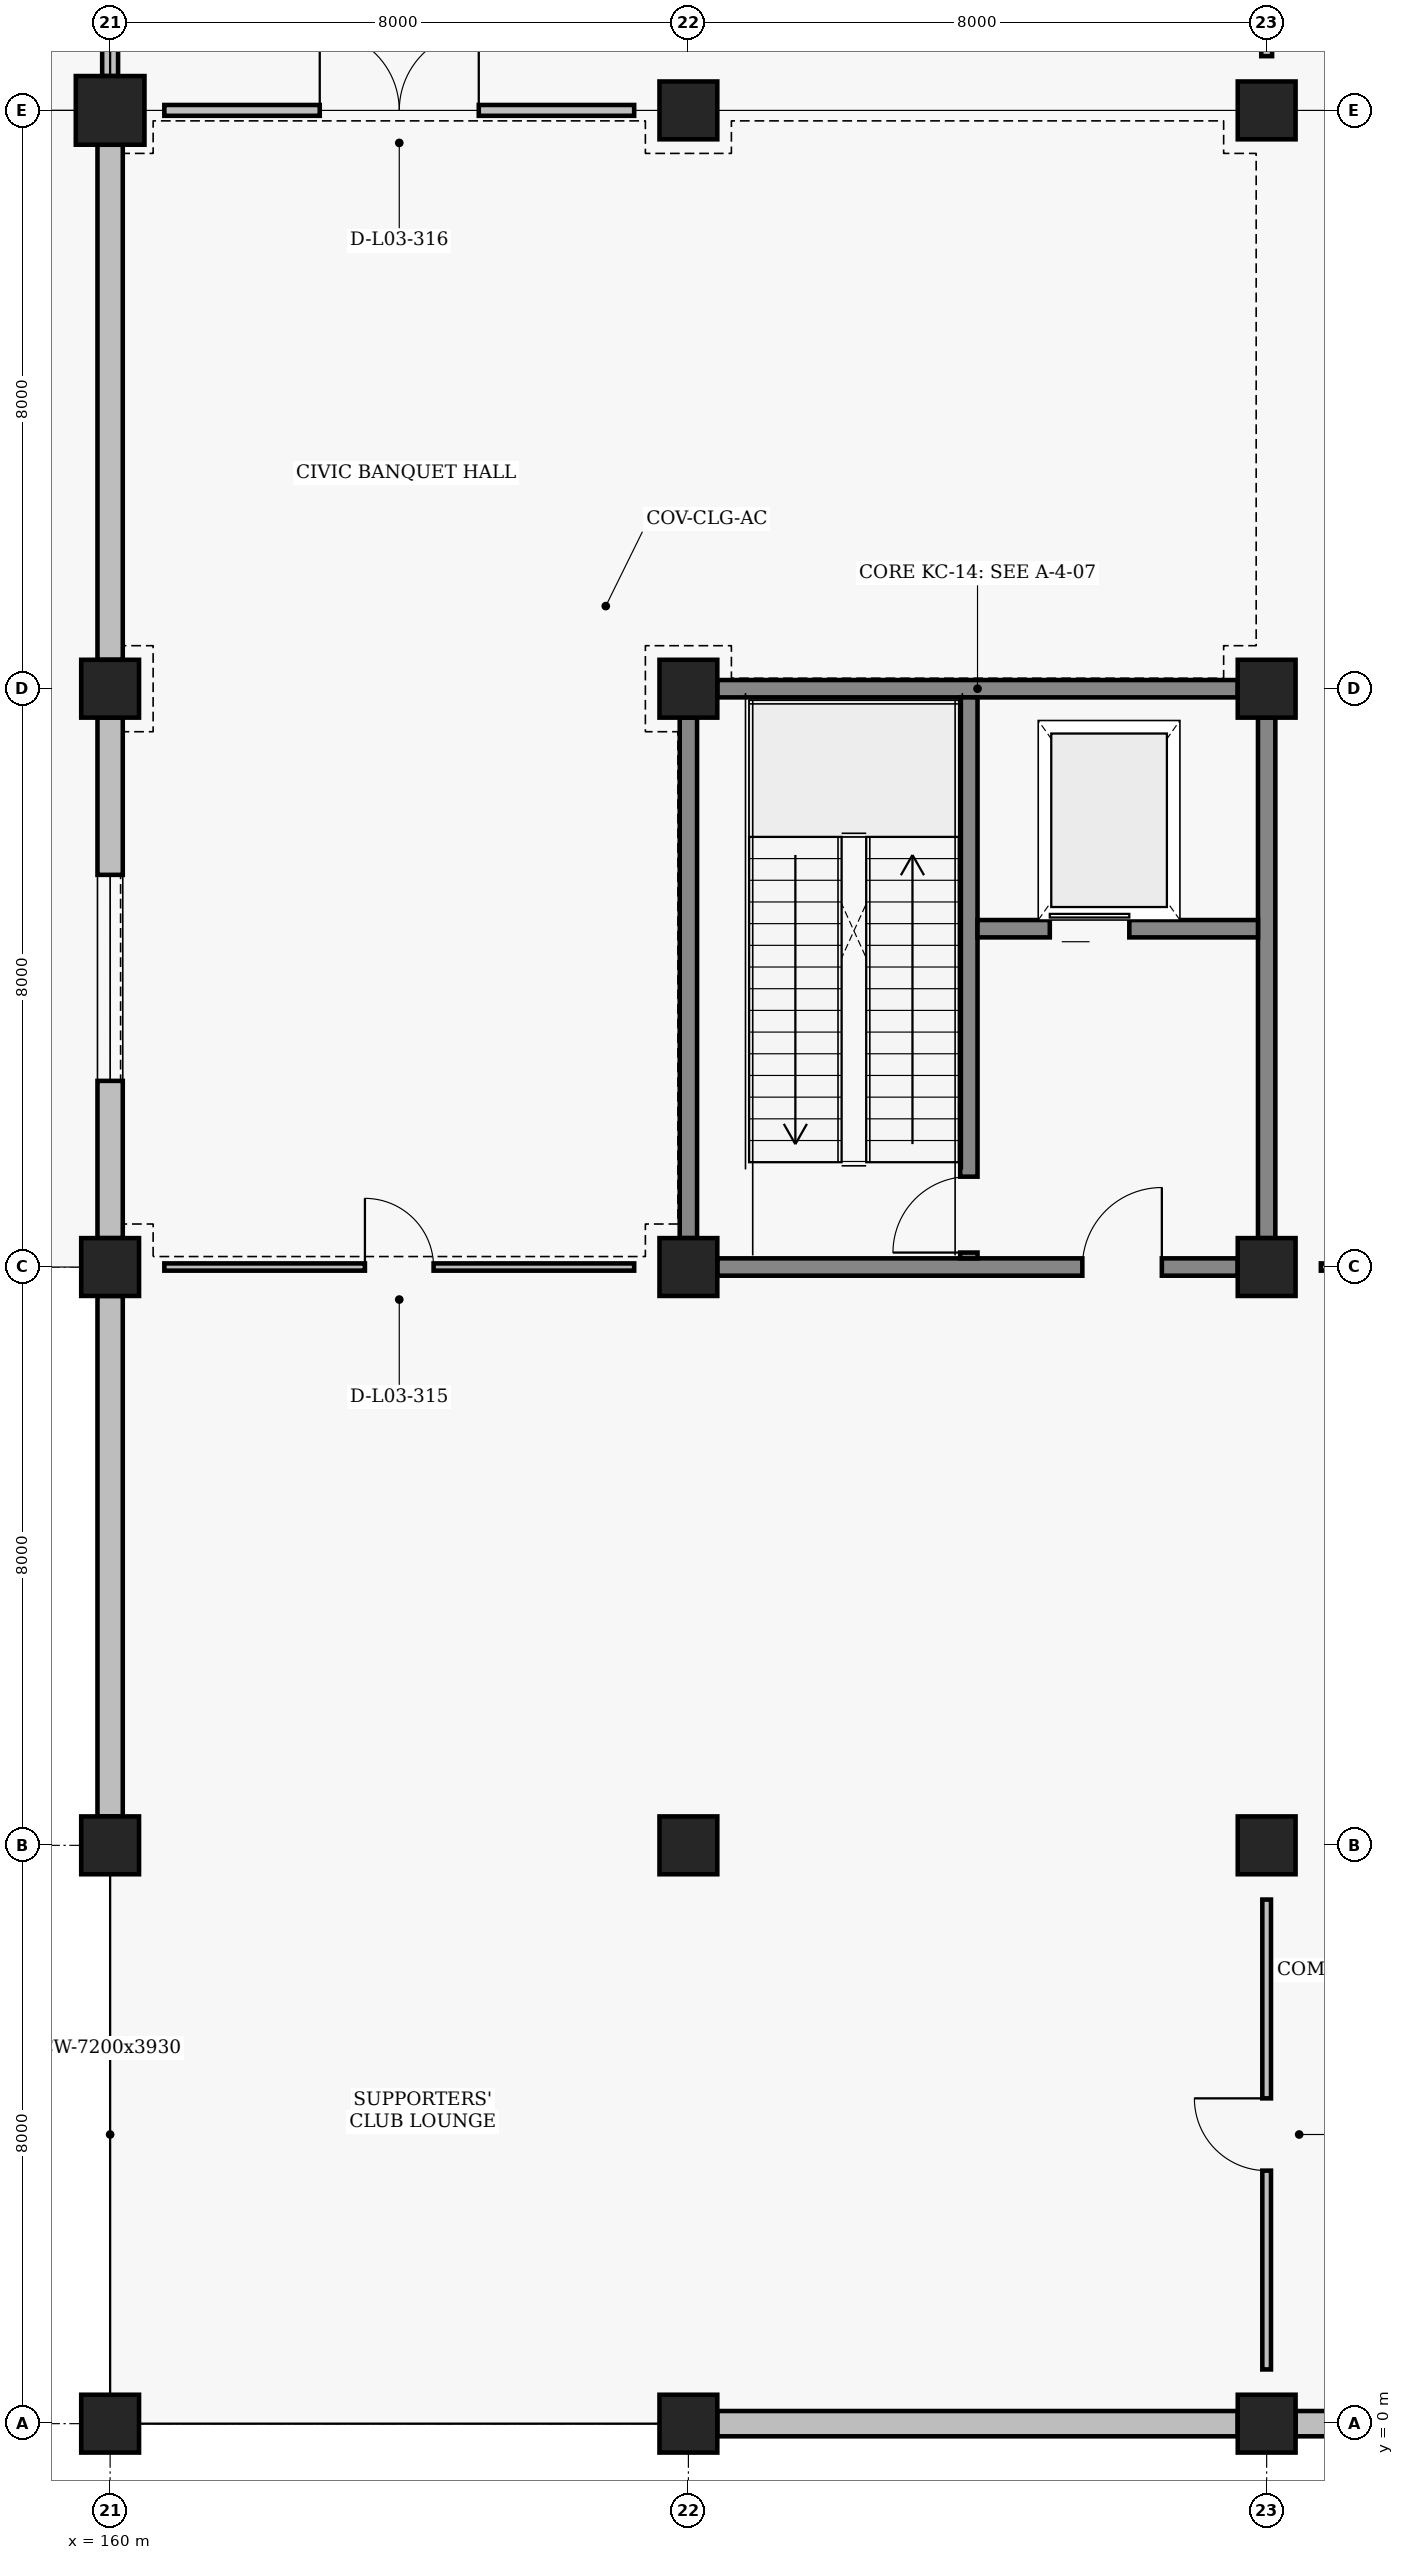
"""IFC4 building model, lengths in metres.
Left out: names, types, materials, properties, quantities, classifications, styles, units other than length and angle.
Written with IfcOpenShell. Run it as: python <this file> out.ifc"""

import sys

from ifc_helpers import new_model, si_unit, direction, frame, frame_2d, origin, origin_2d, place, context, subcontext, project, spatial, rectangle, extrude, element, fill, save


model = new_model("IFC4")
c1 = context("Model", 3, precision=1e-05, world=origin(), true_north=direction((0.0, 1.0)))
c2 = subcontext(c1, "Body", "Model", "MODEL_VIEW")
j1 = project(units=[si_unit("LENGTHUNIT", "METRE"), si_unit("PLANEANGLEUNIT", "RADIAN")], contexts=[c1])
p1 = place(None, origin())
s1 = spatial("IfcSite", under=j1, at=p1, CompositionType="ELEMENT")
p2 = place(p1, origin())
s2 = spatial("IfcBuilding", under=s1, at=p2, CompositionType="ELEMENT")
p3 = place(p2, frame((0.0, 0.0, 9.6)))
s3 = spatial("IfcBuildingStorey", under=s2, at=p3, CompositionType="ELEMENT", Elevation=9.6)
for number, where, z_axis, x_axis in (
    (1, (160.0, 0.0, 0.0), (0.0, 0.0, 1.0), (1.0, 0.0, 0.0)),
    (2, (160.0, 8.0, 0.0), (0.0, 0.0, 1.0), (1.0, 0.0, 0.0)),
    (3, (160.0, 16.0, 0.0), (0.0, 0.0, 1.0), (1.0, 0.0, 0.0)),
    (4, (160.0, 24.0, 0.0), (0.0, 0.0, 1.0), (1.0, 0.0, 0.0)),
):
    element("IfcColumn", number, at=place(p3, frame(where, z_axis=z_axis, x_axis=x_axis)), inside=s3, PredefinedType="COLUMN", context=c2, shape_type="SweptSolid", body=[
        extrude(rectangle(XDim=0.8, YDim=0.8, at=origin_2d()), origin(), (0.0, 0.0, 1.0), 4.8),
    ])
p4 = place(p3, frame((160.0, 32.0, 0.0), z_axis=(0.0, 0.0, 1.0), x_axis=(1.0, 0.0, 0.0)))
e5 = element("IfcColumn", 5, at=p4, inside=s3, PredefinedType="COLUMN", context=c2, shape_type="SweptSolid", body=[
    extrude(rectangle(XDim=0.95, YDim=0.95, at=origin_2d()), origin(), (0.0, 0.0, 1.0), 4.8),
])
for number, where, z_axis, x_axis in (
    (6, (168.0, 0.0, 0.0), (0.0, 0.0, 1.0), (1.0, 0.0, 0.0)),
    (7, (168.0, 8.0, 0.0), (0.0, 0.0, 1.0), (1.0, 0.0, 0.0)),
    (8, (168.0, 16.0, 0.0), (0.0, 0.0, 1.0), (1.0, 0.0, 0.0)),
    (9, (168.0, 24.0, 0.0), (0.0, 0.0, 1.0), (1.0, 0.0, 0.0)),
    (10, (168.0, 32.0, 0.0), (0.0, 0.0, 1.0), (1.0, 0.0, 0.0)),
    (11, (176.0, 0.0, 0.0), (0.0, 0.0, 1.0), (1.0, 0.0, 0.0)),
    (12, (176.0, 8.0, 0.0), (0.0, 0.0, 1.0), (1.0, 0.0, 0.0)),
    (13, (176.0, 16.0, 0.0), (0.0, 0.0, 1.0), (1.0, 0.0, 0.0)),
    (14, (176.0, 24.0, 0.0), (0.0, 0.0, 1.0), (1.0, 0.0, 0.0)),
    (15, (176.0, 32.0, 0.0), (0.0, 0.0, 1.0), (1.0, 0.0, 0.0)),
):
    element("IfcColumn", number, at=place(p3, frame(where, z_axis=z_axis, x_axis=x_axis)), inside=s3, PredefinedType="COLUMN", context=c2, shape_type="SweptSolid", body=[
        extrude(rectangle(XDim=0.8, YDim=0.8, at=origin_2d()), origin(), (0.0, 0.0, 1.0), 4.8),
    ])
p5 = place(p3, frame((160.0, 8.4, 0.0), z_axis=(0.0, 0.0, 1.0), x_axis=(0.0, 1.0, 0.0)))
e16 = element("IfcWall", 16, at=p5, inside=s3, PredefinedType="SOLIDWALL", context=c2, shape_type="SweptSolid", body=[
    extrude(rectangle(XDim=7.2, YDim=0.35, at=frame_2d((3.6, 0.0))), origin(), (0.0, 0.0, 1.0), 3.93),
])
p6 = place(p3, frame((160.0, 16.4, 0.0), z_axis=(0.0, 0.0, 1.0), x_axis=(0.0, 1.0, 0.0)))
e17 = element("IfcWall", 17, at=p6, inside=s3, PredefinedType="SOLIDWALL", context=c2, shape_type="SweptSolid", body=[
    extrude(rectangle(XDim=7.2, YDim=0.35, at=frame_2d((3.6, 0.0))), origin(), (0.0, 0.0, 1.0), 3.93),
])
p7 = place(p6, frame((2.175, 0.0, 0.95)))
e18 = element("IfcOpeningElement", 18, at=p7, cuts=e17, PredefinedType="OPENING", context=c2, shape_type="SweptSolid", body=[
    extrude(rectangle(XDim=2.85, YDim=2.1, at=frame_2d((1.425, 1.05))), frame((0.0, 0.185, 0.0), z_axis=(0.0, -1.0, 0.0), x_axis=(1.0, 0.0, 0.0)), (0.0, 0.0, 1.0), 0.37),
])
p8 = place(p3, frame((160.0, 24.4, 0.0), z_axis=(0.0, 0.0, 1.0), x_axis=(0.0, 1.0, 0.0)))
e19 = element("IfcWall", 19, at=p8, inside=s3, PredefinedType="SOLIDWALL", context=c2, shape_type="SweptSolid", body=[
    extrude(rectangle(XDim=7.125, YDim=0.35, at=frame_2d((3.562, 0.0))), origin(), (0.0, 0.0, 1.0), 3.68),
])
p9 = place(p3, frame((160.0, 32.475, 0.0), z_axis=(0.0, 0.0, 1.0), x_axis=(0.0, 1.0, 0.0)))
e20 = element("IfcWall", 20, at=p9, inside=s3, PredefinedType="PARAPET", context=c2, shape_type="SweptSolid", body=[
    extrude(rectangle(XDim=7.05, YDim=0.22, at=frame_2d((3.525, 0.0))), origin(), (0.0, 0.0, 1.0), 0.16),
])
p10 = place(p3, frame((168.4, 0.0, 0.0), z_axis=(0.0, 0.0, 1.0), x_axis=(1.0, 0.0, 0.0)))
e21 = element("IfcWall", 21, at=p10, inside=s3, PredefinedType="SOLIDWALL", context=c2, shape_type="SweptSolid", body=[
    extrude(rectangle(XDim=7.2, YDim=0.35, at=frame_2d((3.6, 0.0))), origin(), (0.0, 0.0, 1.0), 3.93),
])
p11 = place(p3, frame((176.4, 0.0, 0.0), z_axis=(0.0, 0.0, 1.0), x_axis=(1.0, 0.0, 0.0)))
e22 = element("IfcWall", 22, at=p11, inside=s3, PredefinedType="SOLIDWALL", context=c2, shape_type="SweptSolid", body=[
    extrude(rectangle(XDim=7.2, YDim=0.35, at=frame_2d((3.6, 0.0))), origin(), (0.0, 0.0, 1.0), 3.93),
])
p12 = place(p11, frame((2.4, 0.0, 1.9)))
e23 = element("IfcOpeningElement", 23, at=p12, cuts=e22, PredefinedType="OPENING", context=c2, shape_type="SweptSolid", body=[
    extrude(rectangle(XDim=2.4, YDim=1.1, at=frame_2d((1.2, 0.55))), frame((0.0, 0.185, 0.0), z_axis=(0.0, -1.0, 0.0), x_axis=(1.0, 0.0, 0.0)), (0.0, 0.0, 1.0), 0.37),
])
p13 = place(p3, frame((168.4, 16.0, 0.0), z_axis=(0.0, 0.0, 1.0), x_axis=(1.0, 0.0, 0.0)))
e24 = element("IfcWall", 24, at=p13, inside=s3, PredefinedType="SHEAR", context=c2, shape_type="SweptSolid", body=[
    extrude(rectangle(XDim=7.2, YDim=0.24, at=frame_2d((3.6, 0.0))), origin(), (0.0, 0.0, 1.0), 3.68),
])
p14 = place(p13, frame((5.05, 0.0, 0.0)))
e25 = element("IfcOpeningElement", 25, at=p14, cuts=e24, PredefinedType="OPENING", context=c2, shape_type="SweptSolid", body=[
    extrude(rectangle(XDim=1.1, YDim=2.2, at=frame_2d((0.55, 1.1))), frame((0.0, 0.13, 0.0), z_axis=(0.0, -1.0, 0.0), x_axis=(1.0, 0.0, 0.0)), (0.0, 0.0, 1.0), 0.26),
])
for number, where, z_axis, x_axis in (
    (26, (168.4, 24.0, 0.0), (0.0, 0.0, 1.0), (1.0, 0.0, 0.0)),
    (27, (168.0, 16.4, 0.0), (0.0, 0.0, 1.0), (0.0, 1.0, 0.0)),
):
    element("IfcWall", number, at=place(p3, frame(where, z_axis=z_axis, x_axis=x_axis)), inside=s3, PredefinedType="SHEAR", context=c2, shape_type="SweptSolid", body=[
        extrude(rectangle(XDim=7.2, YDim=0.24, at=frame_2d((3.6, 0.0))), origin(), (0.0, 0.0, 1.0), 3.93),
    ])
p15 = place(p3, frame((176.0, 16.4, 0.0), z_axis=(0.0, 0.0, 1.0), x_axis=(0.0, 1.0, 0.0)))
e28 = element("IfcWall", 28, at=p15, inside=s3, PredefinedType="SHEAR", context=c2, shape_type="SweptSolid", body=[
    extrude(rectangle(XDim=7.2, YDim=0.24, at=frame_2d((3.6, 0.0))), origin(), (0.0, 0.0, 1.0), 3.68),
])
p16 = place(p3, frame((171.88, 16.12, 0.0), z_axis=(0.0, 0.0, 1.0), x_axis=(0.0, 1.0, 0.0)))
e29 = element("IfcWall", 29, at=p16, inside=s3, PredefinedType="SHEAR", context=c2, shape_type="SweptSolid", body=[
    extrude(rectangle(XDim=7.76, YDim=0.24, at=frame_2d((3.88, 0.0))), origin(), (0.0, 0.0, 1.0), 4.03),
])
p17 = place(p16, frame((0.08, 0.0, 0.0)))
e30 = element("IfcOpeningElement", 30, at=p17, cuts=e29, PredefinedType="OPENING", context=c2, shape_type="SweptSolid", body=[
    extrude(rectangle(XDim=1.05, YDim=2.15, at=frame_2d((0.525, 1.075))), frame((0.0, 0.13, 0.0), z_axis=(0.0, -1.0, 0.0), x_axis=(1.0, 0.0, 0.0)), (0.0, 0.0, 1.0), 0.26),
])
p18 = place(p3, frame((172.0, 20.68, 0.0), z_axis=(0.0, 0.0, 1.0), x_axis=(1.0, 0.0, 0.0)))
e31 = element("IfcWall", 31, at=p18, inside=s3, PredefinedType="SHEAR", context=c2, shape_type="SweptSolid", body=[
    extrude(rectangle(XDim=3.88, YDim=0.24, at=frame_2d((1.94, 0.0))), origin(), (0.0, 0.0, 1.0), 3.93),
])
p19 = place(p18, frame((1.0, 0.0, 0.0)))
e32 = element("IfcOpeningElement", 32, at=p19, cuts=e31, PredefinedType="OPENING", context=c2, shape_type="SweptSolid", body=[
    extrude(rectangle(XDim=1.1, YDim=2.15, at=frame_2d((0.55, 1.075))), frame((0.0, 0.13, 0.0), z_axis=(0.0, -1.0, 0.0), x_axis=(1.0, 0.0, 0.0)), (0.0, 0.0, 1.0), 0.26),
])
p20 = place(p3, frame((160.75, 16.0, 0.0), z_axis=(0.0, 0.0, 1.0), x_axis=(1.0, 0.0, 0.0)))
e33 = element("IfcWall", 33, at=p20, inside=s3, PredefinedType="PARTITIONING", context=c2, shape_type="SweptSolid", body=[
    extrude(rectangle(XDim=6.5, YDim=0.1, at=frame_2d((3.25, 0.0))), origin(), (0.0, 0.0, 1.0), 3.93),
])
p21 = place(p20, frame((2.775, 0.0, 0.0)))
e34 = element("IfcOpeningElement", 34, at=p21, cuts=e33, PredefinedType="OPENING", context=c2, shape_type="SweptSolid", body=[
    extrude(rectangle(XDim=0.95, YDim=2.1, at=frame_2d((0.475, 1.05))), frame((0.0, 0.06, 0.0), z_axis=(0.0, -1.0, 0.0), x_axis=(1.0, 0.0, 0.0)), (0.0, 0.0, 1.0), 0.12),
])
p22 = place(p3, frame((160.75, 32.0, 0.0), z_axis=(0.0, 0.0, 1.0), x_axis=(1.0, 0.0, 0.0)))
e35 = element("IfcWall", 35, at=p22, inside=s3, PredefinedType="PARTITIONING", context=c2, shape_type="SweptSolid", body=[
    extrude(rectangle(XDim=6.5, YDim=0.15, at=frame_2d((3.25, 0.0))), origin(), (0.0, 0.0, 1.0), 3.68),
])
p23 = place(p22, frame((2.15, 0.0, 0.0)))
e36 = element("IfcOpeningElement", 36, at=p23, cuts=e35, PredefinedType="OPENING", context=c2, shape_type="SweptSolid", body=[
    extrude(rectangle(XDim=2.2, YDim=2.4, at=frame_2d((1.1, 1.2))), frame((0.0, 0.085, 0.0), z_axis=(0.0, -1.0, 0.0), x_axis=(1.0, 0.0, 0.0)), (0.0, 0.0, 1.0), 0.17),
])
p24 = place(p3, frame((176.0, 0.75, 0.0), z_axis=(0.0, 0.0, 1.0), x_axis=(0.0, 1.0, 0.0)))
e37 = element("IfcWall", 37, at=p24, inside=s3, PredefinedType="PARTITIONING", context=c2, shape_type="SweptSolid", body=[
    extrude(rectangle(XDim=6.5, YDim=0.12, at=frame_2d((3.25, 0.0))), origin(), (0.0, 0.0, 1.0), 3.93),
])
p25 = place(p24, frame((2.75, 0.0, 0.0)))
e38 = element("IfcOpeningElement", 38, at=p25, cuts=e37, PredefinedType="OPENING", context=c2, shape_type="SweptSolid", body=[
    extrude(rectangle(XDim=1.0, YDim=2.1, at=frame_2d((0.5, 1.05))), frame((0.0, 0.07, 0.0), z_axis=(0.0, -1.0, 0.0), x_axis=(1.0, 0.0, 0.0)), (0.0, 0.0, 1.0), 0.14),
])
p26 = place(p3, frame((176.75, 16.0, 0.0), z_axis=(0.0, 0.0, 1.0), x_axis=(1.0, 0.0, 0.0)))
e39 = element("IfcWall", 39, at=p26, inside=s3, PredefinedType="PARTITIONING", context=c2, shape_type="SweptSolid", body=[
    extrude(rectangle(XDim=6.5, YDim=0.1, at=frame_2d((3.25, 0.0))), origin(), (0.0, 0.0, 1.0), 3.68),
])
p27 = place(p26, frame((2.775, 0.0, 0.0)))
e40 = element("IfcOpeningElement", 40, at=p27, cuts=e39, PredefinedType="OPENING", context=c2, shape_type="SweptSolid", body=[
    extrude(rectangle(XDim=0.95, YDim=2.1, at=frame_2d((0.475, 1.05))), frame((0.0, 0.06, 0.0), z_axis=(0.0, -1.0, 0.0), x_axis=(1.0, 0.0, 0.0)), (0.0, 0.0, 1.0), 0.12),
])
p28 = place(p3, frame((176.0, 32.75, 0.0), z_axis=(0.0, 0.0, 1.0), x_axis=(0.0, 1.0, 0.0)))
e41 = element("IfcWall", 41, at=p28, inside=s3, PredefinedType="PARTITIONING", context=c2, shape_type="SweptSolid", body=[
    extrude(rectangle(XDim=6.5, YDim=0.15, at=frame_2d((3.25, 0.0))), origin(), (0.0, 0.0, 1.0), 3.79),
])
p29 = place(p28, frame((2.15, 0.0, 0.0)))
e42 = element("IfcOpeningElement", 42, at=p29, cuts=e41, PredefinedType="OPENING", context=c2, shape_type="SweptSolid", body=[
    extrude(rectangle(XDim=2.2, YDim=2.4, at=frame_2d((1.1, 1.2))), frame((0.0, 0.085, 0.0), z_axis=(0.0, -1.0, 0.0), x_axis=(1.0, 0.0, 0.0)), (0.0, 0.0, 1.0), 0.17),
])
p30 = place(p7, origin())
e43 = element("IfcWindow", 43, at=p30, inside=s3, PartitioningType="SINGLE_PANEL", PredefinedType="WINDOW", context=c2, shape_type="SweptSolid", body=[
    extrude(rectangle(XDim=2.85, YDim=2.1, at=frame_2d((1.425, 1.05))), frame((0.0, 0.03, 0.0), z_axis=(0.0, -1.0, 0.0), x_axis=(1.0, 0.0, 0.0)), (0.0, 0.0, 1.0), 0.06),
])
fill(e18, e43)
p31 = place(p14, origin())
e44 = element("IfcDoor", 44, at=p31, inside=s3, OperationType="SINGLE_SWING_RIGHT", PredefinedType="DOOR", context=c2, shape_type="SweptSolid", body=[
    extrude(rectangle(XDim=1.1, YDim=2.2, at=frame_2d((0.55, 1.1))), frame((0.0, 0.025, 0.0), z_axis=(0.0, -1.0, 0.0), x_axis=(1.0, 0.0, 0.0)), (0.0, 0.0, 1.0), 0.05),
])
fill(e25, e44)
p32 = place(p17, origin())
e45 = element("IfcDoor", 45, at=p32, inside=s3, OperationType="SINGLE_SWING_LEFT", PredefinedType="DOOR", context=c2, shape_type="SweptSolid", body=[
    extrude(rectangle(XDim=1.05, YDim=2.15, at=frame_2d((0.525, 1.075))), frame((0.0, 0.025, 0.0), z_axis=(0.0, -1.0, 0.0), x_axis=(1.0, 0.0, 0.0)), (0.0, 0.0, 1.0), 0.05),
])
fill(e30, e45)
p33 = place(p19, origin())
e46 = element("IfcDoor", 46, at=p33, inside=s3, OperationType="SLIDING_TO_LEFT", PredefinedType="DOOR", context=c2, shape_type="SweptSolid", body=[
    extrude(rectangle(XDim=1.1, YDim=2.15, at=frame_2d((0.55, 1.075))), frame((0.0, 0.025, 0.0), z_axis=(0.0, -1.0, 0.0), x_axis=(1.0, 0.0, 0.0)), (0.0, 0.0, 1.0), 0.05),
])
fill(e32, e46)
p34 = place(p21, origin())
e47 = element("IfcDoor", 47, at=p34, inside=s3, OperationType="SINGLE_SWING_LEFT", PredefinedType="DOOR", context=c2, shape_type="SweptSolid", body=[
    extrude(rectangle(XDim=0.95, YDim=2.1, at=frame_2d((0.475, 1.05))), frame((0.0, 0.025, 0.0), z_axis=(0.0, -1.0, 0.0), x_axis=(1.0, 0.0, 0.0)), (0.0, 0.0, 1.0), 0.05),
])
fill(e34, e47)
p35 = place(p23, origin())
e48 = element("IfcDoor", 48, at=p35, inside=s3, OperationType="DOUBLE_SWING_LEFT", PredefinedType="DOOR", context=c2, shape_type="SweptSolid", body=[
    extrude(rectangle(XDim=2.2, YDim=2.4, at=frame_2d((1.1, 1.2))), frame((0.0, 0.025, 0.0), z_axis=(0.0, -1.0, 0.0), x_axis=(1.0, 0.0, 0.0)), (0.0, 0.0, 1.0), 0.05),
])
fill(e36, e48)
p36 = place(p25, origin())
e49 = element("IfcDoor", 49, at=p36, inside=s3, OperationType="SINGLE_SWING_RIGHT", PredefinedType="DOOR", context=c2, shape_type="SweptSolid", body=[
    extrude(rectangle(XDim=1.0, YDim=2.1, at=frame_2d((0.5, 1.05))), frame((0.0, 0.025, 0.0), z_axis=(0.0, -1.0, 0.0), x_axis=(1.0, 0.0, 0.0)), (0.0, 0.0, 1.0), 0.05),
])
fill(e38, e49)
save(model, sys.argv[1])
